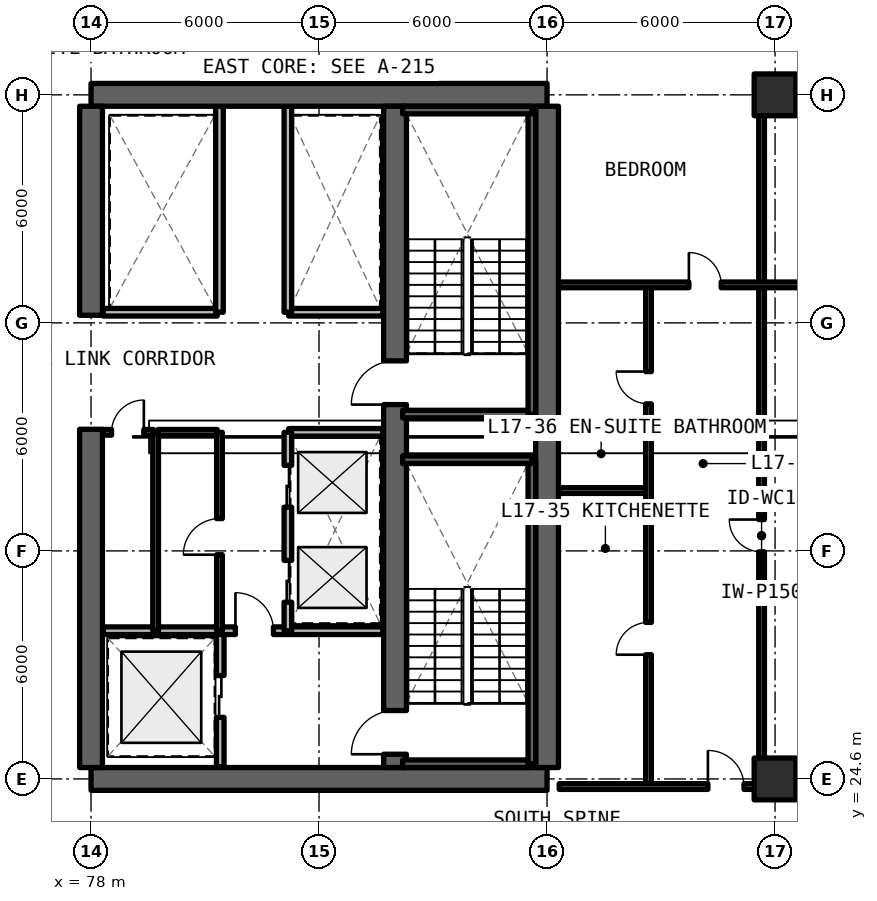
"""IFC4 building model, lengths in metres.
Left out: names, types, materials, properties, quantities, classifications, styles, units other than length and angle.
Written with IfcOpenShell. Run it as: python <this file> out.ifc"""

import sys

from ifc_helpers import new_model, si_unit, direction, frame, frame_2d, origin, origin_2d, place, context, subcontext, project, spatial, rectangle, extrude, element, fill, save


model = new_model("IFC4")
c1 = context("Model", 3, precision=1e-05, world=origin(), true_north=direction((0.0, 1.0)))
c2 = subcontext(c1, "Body", "Model", "MODEL_VIEW")
j1 = project(units=[si_unit("LENGTHUNIT", "METRE"), si_unit("PLANEANGLEUNIT", "RADIAN")], contexts=[c1])
p1 = place(None, origin())
s1 = spatial("IfcSite", under=j1, at=p1, CompositionType="ELEMENT")
p2 = place(p1, origin())
s2 = spatial("IfcBuilding", under=s1, at=p2, CompositionType="ELEMENT")
p3 = place(p2, frame((0.0, 0.0, 62.37)))
s3 = spatial("IfcBuildingStorey", under=s2, at=p3, CompositionType="ELEMENT", Elevation=62.37)
for number, where, z_axis, x_axis in (
    (1, (78.0, 24.6, 0.0), (0.0, 0.0, 1.0), (1.0, 0.0, 0.0)),
    (2, (90.0, 42.6, 0.0), (0.0, 0.0, 1.0), (-1.0, 0.0, 0.0)),
):
    element("IfcWall", number, at=place(p3, frame(where, z_axis=z_axis, x_axis=x_axis)), inside=s3, PredefinedType="SHEAR", context=c2, shape_type="SweptSolid", body=[
        extrude(rectangle(XDim=12.0, YDim=0.6, at=frame_2d((6.0, 0.0))), origin(), (0.0, 0.0, 1.0), 3.63),
    ])
p4 = place(p3, frame((90.0, 24.9, 0.0), z_axis=(0.0, 0.0, 1.0), x_axis=(0.0, 1.0, 0.0)))
e3 = element("IfcWall", 3, at=p4, inside=s3, PredefinedType="SHEAR", context=c2, shape_type="SweptSolid", body=[
    extrude(rectangle(XDim=17.4, YDim=0.6, at=frame_2d((8.7, 0.0))), origin(), (0.0, 0.0, 1.0), 3.63),
])
p5 = place(p3, frame((78.0, 24.9, 0.0), z_axis=(0.0, 0.0, 1.0), x_axis=(0.0, 1.0, 0.0)))
e4 = element("IfcWall", 4, at=p5, inside=s3, PredefinedType="SHEAR", context=c2, shape_type="SweptSolid", body=[
    extrude(rectangle(XDim=8.9, YDim=0.6, at=frame_2d((4.45, 0.0))), origin(), (0.0, 0.0, 1.0), 3.63),
])
p6 = place(p3, frame((78.0, 36.8, 0.0), z_axis=(0.0, 0.0, 1.0), x_axis=(0.0, 1.0, 0.0)))
e5 = element("IfcWall", 5, at=p6, inside=s3, PredefinedType="SHEAR", context=c2, shape_type="SweptSolid", body=[
    extrude(rectangle(XDim=5.5, YDim=0.6, at=frame_2d((2.75, 0.0))), origin(), (0.0, 0.0, 1.0), 3.63),
])
p7 = place(p3, frame((86.0, 24.9, 0.0), z_axis=(0.0, 0.0, 1.0), x_axis=(0.0, 1.0, 0.0)))
e6 = element("IfcWall", 6, at=p7, inside=s3, PredefinedType="SHEAR", context=c2, shape_type="SweptSolid", body=[
    extrude(rectangle(XDim=17.4, YDim=0.6, at=frame_2d((8.7, 0.0))), origin(), (0.0, 0.0, 1.0), 3.63),
])
p8 = place(p7, frame((0.35, 0.0, 0.0)))
e7 = element("IfcOpeningElement", 7, at=p8, cuts=e6, PredefinedType="OPENING", context=c2, shape_type="SweptSolid", body=[
    extrude(rectangle(XDim=1.15, YDim=2.15, at=frame_2d((0.575, 1.075))), frame((0.0, 0.31, 0.0), z_axis=(0.0, -1.0, 0.0), x_axis=(1.0, 0.0, 0.0)), (0.0, 0.0, 1.0), 0.62),
])
p9 = place(p7, frame((9.55, 0.0, 0.0)))
e8 = element("IfcOpeningElement", 8, at=p9, cuts=e6, PredefinedType="OPENING", context=c2, shape_type="SweptSolid", body=[
    extrude(rectangle(XDim=1.15, YDim=2.15, at=frame_2d((0.575, 1.075))), frame((0.0, 0.31, 0.0), z_axis=(0.0, -1.0, 0.0), x_axis=(1.0, 0.0, 0.0)), (0.0, 0.0, 1.0), 0.62),
])
for number, where, z_axis, x_axis in (
    (9, (96.0, 24.6, 0.0), (0.0, 0.0, 1.0), (1.0, 0.0, 0.0)),
    (10, (96.0, 42.6, 0.0), (0.0, 0.0, 1.0), (1.0, 0.0, 0.0)),
):
    element("IfcColumn", number, at=place(p3, frame(where, z_axis=z_axis, x_axis=x_axis)), inside=s3, PredefinedType="COLUMN", context=c2, shape_type="SweptSolid", body=[
        extrude(rectangle(XDim=1.1, YDim=1.1, at=origin_2d()), origin(), (0.0, 0.0, 1.0), 3.63),
    ])
p10 = place(p3, frame((81.4, 24.92, 0.0), z_axis=(0.0, 0.0, 1.0), x_axis=(0.0, 1.0, 0.0)))
e11 = element("IfcWall", 11, at=p10, inside=s3, PredefinedType="SOLIDWALL", context=c2, shape_type="SweptSolid", body=[
    extrude(rectangle(XDim=3.58, YDim=0.2, at=frame_2d((1.79, 0.0))), origin(), (0.0, 0.0, 1.0), 2.63),
])
p11 = place(p10, frame((1.3, 0.0, 0.0)))
e12 = element("IfcOpeningElement", 12, at=p11, cuts=e11, PredefinedType="OPENING", context=c2, shape_type="SweptSolid", body=[
    extrude(rectangle(XDim=1.1, YDim=2.2, at=frame_2d((0.55, 1.1))), frame((0.0, 0.11, 0.0), z_axis=(0.0, -1.0, 0.0), x_axis=(1.0, 0.0, 0.0)), (0.0, 0.0, 1.0), 0.22),
])
p12 = place(p3, frame((78.32, 28.5, 0.0), z_axis=(0.0, 0.0, 1.0), x_axis=(1.0, 0.0, 0.0)))
e13 = element("IfcWall", 13, at=p12, inside=s3, PredefinedType="SOLIDWALL", context=c2, shape_type="SweptSolid", body=[
    extrude(rectangle(XDim=7.36, YDim=0.2, at=frame_2d((3.68, 0.0))), origin(), (0.0, 0.0, 1.0), 2.63),
])
p13 = place(p12, frame((3.48, 0.0, 0.0)))
e14 = element("IfcOpeningElement", 14, at=p13, cuts=e13, PredefinedType="OPENING", context=c2, shape_type="SweptSolid", body=[
    extrude(rectangle(XDim=1.0, YDim=2.15, at=frame_2d((0.5, 1.075))), frame((0.0, 0.11, 0.0), z_axis=(0.0, -1.0, 0.0), x_axis=(1.0, 0.0, 0.0)), (0.0, 0.0, 1.0), 0.22),
])
p14 = place(p3, frame((83.2, 33.72, 0.0), z_axis=(0.0, 0.0, 1.0), x_axis=(1.0, 0.0, 0.0)))
e15 = element("IfcWall", 15, at=p14, inside=s3, PredefinedType="SOLIDWALL", context=c2, shape_type="SweptSolid", body=[
    extrude(rectangle(XDim=2.48, YDim=0.2, at=frame_2d((1.24, 0.0))), origin(), (0.0, 0.0, 1.0), 2.63),
])
p15 = place(p3, frame((83.18, 28.5, 0.0), z_axis=(0.0, 0.0, 1.0), x_axis=(0.0, 1.0, 0.0)))
e16 = element("IfcWall", 16, at=p15, inside=s3, PredefinedType="SOLIDWALL", context=c2, shape_type="SweptSolid", body=[
    extrude(rectangle(XDim=5.22, YDim=0.2, at=frame_2d((2.61, 0.0))), origin(), (0.0, 0.0, 1.0), 2.63),
])
p16 = place(p15, frame((0.75, 0.0, 0.0)))
e17 = element("IfcOpeningElement", 17, at=p16, cuts=e16, PredefinedType="OPENING", context=c2, shape_type="SweptSolid", body=[
    extrude(rectangle(XDim=1.1, YDim=2.2, at=frame_2d((0.55, 1.1))), frame((0.0, 0.11, 0.0), z_axis=(0.0, -1.0, 0.0), x_axis=(1.0, 0.0, 0.0)), (0.0, 0.0, 1.0), 0.22),
])
p17 = place(p15, frame((3.25, 0.0, 0.0)))
e18 = element("IfcOpeningElement", 18, at=p17, cuts=e16, PredefinedType="OPENING", context=c2, shape_type="SweptSolid", body=[
    extrude(rectangle(XDim=1.1, YDim=2.2, at=frame_2d((0.55, 1.1))), frame((0.0, 0.11, 0.0), z_axis=(0.0, -1.0, 0.0), x_axis=(1.0, 0.0, 0.0)), (0.0, 0.0, 1.0), 0.22),
])
p18 = place(p3, frame((79.7, 28.5, 0.0), z_axis=(0.0, 0.0, 1.0), x_axis=(0.0, 1.0, 0.0)))
e19 = element("IfcWall", 19, at=p18, inside=s3, PredefinedType="SOLIDWALL", context=c2, shape_type="SweptSolid", body=[
    extrude(rectangle(XDim=5.22, YDim=0.15, at=frame_2d((2.61, 0.0))), origin(), (0.0, 0.0, 1.0), 2.63),
])
p19 = place(p3, frame((79.76, 33.72, 0.0), z_axis=(0.0, 0.0, 1.0), x_axis=(1.0, 0.0, 0.0)))
e20 = element("IfcWall", 20, at=p19, inside=s3, PredefinedType="SOLIDWALL", context=c2, shape_type="SweptSolid", body=[
    extrude(rectangle(XDim=1.56, YDim=0.15, at=frame_2d((0.78, 0.0))), origin(), (0.0, 0.0, 1.0), 2.63),
])
p20 = place(p3, frame((78.32, 33.72, 0.0), z_axis=(0.0, 0.0, 1.0), x_axis=(1.0, 0.0, 0.0)))
e21 = element("IfcWall", 21, at=p20, inside=s3, PredefinedType="SOLIDWALL", context=c2, shape_type="SweptSolid", body=[
    extrude(rectangle(XDim=1.32, YDim=0.15, at=frame_2d((0.66, 0.0))), origin(), (0.0, 0.0, 1.0), 2.63),
])
p21 = place(p20, frame((0.22, 0.0, 0.0)))
e22 = element("IfcOpeningElement", 22, at=p21, cuts=e21, PredefinedType="OPENING", context=c2, shape_type="SweptSolid", body=[
    extrude(rectangle(XDim=0.85, YDim=2.1, at=frame_2d((0.425, 1.05))), frame((0.0, 0.085, 0.0), z_axis=(0.0, -1.0, 0.0), x_axis=(1.0, 0.0, 0.0)), (0.0, 0.0, 1.0), 0.17),
])
p22 = place(p3, frame((81.38, 28.5, 0.0), z_axis=(0.0, 0.0, 1.0), x_axis=(0.0, 1.0, 0.0)))
e23 = element("IfcWall", 23, at=p22, inside=s3, PredefinedType="SOLIDWALL", context=c2, shape_type="SweptSolid", body=[
    extrude(rectangle(XDim=5.22, YDim=0.15, at=frame_2d((2.61, 0.0))), origin(), (0.0, 0.0, 1.0), 2.63),
])
p23 = place(p22, frame((2.0, 0.0, 0.0)))
e24 = element("IfcOpeningElement", 24, at=p23, cuts=e23, PredefinedType="OPENING", context=c2, shape_type="SweptSolid", body=[
    extrude(rectangle(XDim=0.95, YDim=2.15, at=frame_2d((0.475, 1.075))), frame((0.0, 0.085, 0.0), z_axis=(0.0, -1.0, 0.0), x_axis=(1.0, 0.0, 0.0)), (0.0, 0.0, 1.0), 0.17),
])
p24 = place(p3, frame((83.2, 36.88, 0.0), z_axis=(0.0, 0.0, 1.0), x_axis=(1.0, 0.0, 0.0)))
e25 = element("IfcWall", 25, at=p24, inside=s3, PredefinedType="SOLIDWALL", context=c2, shape_type="SweptSolid", body=[
    extrude(rectangle(XDim=2.48, YDim=0.2, at=frame_2d((1.24, 0.0))), origin(), (0.0, 0.0, 1.0), 2.63),
])
p25 = place(p3, frame((83.18, 36.88, 0.0), z_axis=(0.0, 0.0, 1.0), x_axis=(0.0, 1.0, 0.0)))
e26 = element("IfcWall", 26, at=p25, inside=s3, PredefinedType="SOLIDWALL", context=c2, shape_type="SweptSolid", body=[
    extrude(rectangle(XDim=5.42, YDim=0.2, at=frame_2d((2.71, 0.0))), origin(), (0.0, 0.0, 1.0), 2.63),
])
p26 = place(p3, frame((78.32, 36.88, 0.0), z_axis=(0.0, 0.0, 1.0), x_axis=(1.0, 0.0, 0.0)))
e27 = element("IfcWall", 27, at=p26, inside=s3, PredefinedType="SOLIDWALL", context=c2, shape_type="SweptSolid", body=[
    extrude(rectangle(XDim=3.0, YDim=0.2, at=frame_2d((1.5, 0.0))), origin(), (0.0, 0.0, 1.0), 2.63),
])
p27 = place(p3, frame((81.38, 36.88, 0.0), z_axis=(0.0, 0.0, 1.0), x_axis=(0.0, 1.0, 0.0)))
e28 = element("IfcWall", 28, at=p27, inside=s3, PredefinedType="SOLIDWALL", context=c2, shape_type="SweptSolid", body=[
    extrude(rectangle(XDim=5.42, YDim=0.2, at=frame_2d((2.71, 0.0))), origin(), (0.0, 0.0, 1.0), 2.63),
])
p28 = place(p3, frame((95.645, 24.4, 0.0), z_axis=(0.0, 0.0, 1.0), x_axis=(0.0, 1.0, 0.0)))
e29 = element("IfcWall", 29, at=p28, inside=s3, PredefinedType="PARTITIONING", context=c2, shape_type="SweptSolid", body=[
    extrude(rectangle(XDim=13.2, YDim=0.15, at=frame_2d((6.6, 0.0))), origin(), (0.0, 0.0, 1.0), 2.63),
])
p29 = place(p28, frame((6.175, 0.0, 0.0)))
e30 = element("IfcOpeningElement", 30, at=p29, cuts=e29, PredefinedType="OPENING", context=c2, shape_type="SweptSolid", body=[
    extrude(rectangle(XDim=0.85, YDim=2.1, at=frame_2d((0.425, 1.05))), frame((0.0, 0.085, 0.0), z_axis=(0.0, -1.0, 0.0), x_axis=(1.0, 0.0, 0.0)), (0.0, 0.0, 1.0), 0.17),
])
p30 = place(p3, frame((90.32, 32.188, 0.0), z_axis=(0.0, 0.0, 1.0), x_axis=(1.0, 0.0, 0.0)))
e31 = element("IfcWall", 31, at=p30, inside=s3, PredefinedType="PARTITIONING", context=c2, shape_type="SweptSolid", body=[
    extrude(rectangle(XDim=2.35, YDim=0.15, at=frame_2d((1.175, 0.0))), origin(), (0.0, 0.0, 1.0), 2.63),
])
p31 = place(p3, frame((92.67, 24.4, 0.0), z_axis=(0.0, 0.0, 1.0), x_axis=(0.0, 1.0, 0.0)))
e32 = element("IfcWall", 32, at=p31, inside=s3, PredefinedType="PARTITIONING", context=c2, shape_type="SweptSolid", body=[
    extrude(rectangle(XDim=13.2, YDim=0.15, at=frame_2d((6.6, 0.0))), origin(), (0.0, 0.0, 1.0), 2.63),
])
p32 = place(p31, frame((3.469, 0.0, 0.0)))
e33 = element("IfcOpeningElement", 33, at=p32, cuts=e32, PredefinedType="OPENING", context=c2, shape_type="SweptSolid", body=[
    extrude(rectangle(XDim=0.85, YDim=2.1, at=frame_2d((0.425, 1.05))), frame((0.0, 0.085, 0.0), z_axis=(0.0, -1.0, 0.0), x_axis=(1.0, 0.0, 0.0)), (0.0, 0.0, 1.0), 0.17),
])
p33 = place(p31, frame((10.069, 0.0, 0.0)))
e34 = element("IfcOpeningElement", 34, at=p33, cuts=e32, PredefinedType="OPENING", context=c2, shape_type="SweptSolid", body=[
    extrude(rectangle(XDim=0.85, YDim=2.1, at=frame_2d((0.425, 1.05))), frame((0.0, 0.085, 0.0), z_axis=(0.0, -1.0, 0.0), x_axis=(1.0, 0.0, 0.0)), (0.0, 0.0, 1.0), 0.17),
])
p34 = place(p3, frame((95.645, 37.6, 0.0), z_axis=(0.0, 0.0, 1.0), x_axis=(0.0, 1.0, 0.0)))
e35 = element("IfcWall", 35, at=p34, inside=s3, PredefinedType="PARTITIONING", context=c2, shape_type="SweptSolid", body=[
    extrude(rectangle(XDim=5.2, YDim=0.15, at=frame_2d((2.6, 0.0))), origin(), (0.0, 0.0, 1.0), 2.63),
])
p35 = place(p3, frame((90.32, 37.6, 0.0), z_axis=(0.0, 0.0, 1.0), x_axis=(1.0, 0.0, 0.0)))
e36 = element("IfcWall", 36, at=p35, inside=s3, PredefinedType="PARTITIONING", context=c2, shape_type="SweptSolid", body=[
    extrude(rectangle(XDim=10.24, YDim=0.15, at=frame_2d((5.12, 0.0))), origin(), (0.0, 0.0, 1.0), 2.63),
])
p36 = place(p35, frame((3.412, 0.0, 0.0)))
e37 = element("IfcOpeningElement", 37, at=p36, cuts=e36, PredefinedType="OPENING", context=c2, shape_type="SweptSolid", body=[
    extrude(rectangle(XDim=0.85, YDim=2.1, at=frame_2d((0.425, 1.05))), frame((0.0, 0.085, 0.0), z_axis=(0.0, -1.0, 0.0), x_axis=(1.0, 0.0, 0.0)), (0.0, 0.0, 1.0), 0.17),
])
p37 = place(p35, frame((7.357, 0.0, 0.0)))
e38 = element("IfcOpeningElement", 38, at=p37, cuts=e36, PredefinedType="OPENING", context=c2, shape_type="SweptSolid", body=[
    extrude(rectangle(XDim=0.85, YDim=2.1, at=frame_2d((0.425, 1.05))), frame((0.0, 0.085, 0.0), z_axis=(0.0, -1.0, 0.0), x_axis=(1.0, 0.0, 0.0)), (0.0, 0.0, 1.0), 0.17),
])
p38 = place(p3, frame((90.32, 24.4, 0.0), z_axis=(0.0, 0.0, 1.0), x_axis=(1.0, 0.0, 0.0)))
e39 = element("IfcWall", 39, at=p38, inside=s3, PredefinedType="SOLIDWALL", context=c2, shape_type="SweptSolid", body=[
    extrude(rectangle(XDim=10.24, YDim=0.15, at=frame_2d((5.12, 0.0))), origin(), (0.0, 0.0, 1.0), 2.625),
])
p39 = place(p38, frame((3.913, 0.0, 0.0)))
e40 = element("IfcOpeningElement", 40, at=p39, cuts=e39, PredefinedType="OPENING", context=c2, shape_type="SweptSolid", body=[
    extrude(rectangle(XDim=0.95, YDim=2.15, at=frame_2d((0.475, 1.075))), frame((0.0, 0.085, 0.0), z_axis=(0.0, -1.0, 0.0), x_axis=(1.0, 0.0, 0.0)), (0.0, 0.0, 1.0), 0.17),
])
p40 = place(p3, frame((86.2, 25.0, 0.0), z_axis=(0.0, 0.0, 1.0), x_axis=(1.0, 0.0, 0.0)))
e41 = element("IfcWall", 41, at=p40, inside=s3, PredefinedType="SOLIDWALL", context=c2, shape_type="SweptSolid", body=[
    extrude(rectangle(XDim=3.4, YDim=0.2, at=frame_2d((1.7, 0.0))), origin(), (0.0, 0.0, 1.0), 3.63),
])
p41 = place(p3, frame((89.6, 25.0, 0.0), z_axis=(0.0, 0.0, 1.0), x_axis=(0.0, 1.0, 0.0)))
e42 = element("IfcWall", 42, at=p41, inside=s3, PredefinedType="SOLIDWALL", context=c2, shape_type="SweptSolid", body=[
    extrude(rectangle(XDim=8.0, YDim=0.2, at=frame_2d((4.0, 0.0))), origin(), (0.0, 0.0, 1.0), 3.63),
])
for number, where, z_axis, x_axis in (
    (43, (89.6, 33.0, 0.0), (0.0, 0.0, 1.0), (-1.0, 0.0, 0.0)),
    (44, (86.2, 34.2, 0.0), (0.0, 0.0, 1.0), (1.0, 0.0, 0.0)),
):
    element("IfcWall", number, at=place(p3, frame(where, z_axis=z_axis, x_axis=x_axis)), inside=s3, PredefinedType="SOLIDWALL", context=c2, shape_type="SweptSolid", body=[
        extrude(rectangle(XDim=3.4, YDim=0.2, at=frame_2d((1.7, 0.0))), origin(), (0.0, 0.0, 1.0), 3.63),
    ])
p42 = place(p3, frame((89.6, 34.2, 0.0), z_axis=(0.0, 0.0, 1.0), x_axis=(0.0, 1.0, 0.0)))
e45 = element("IfcWall", 45, at=p42, inside=s3, PredefinedType="SOLIDWALL", context=c2, shape_type="SweptSolid", body=[
    extrude(rectangle(XDim=8.0, YDim=0.2, at=frame_2d((4.0, 0.0))), origin(), (0.0, 0.0, 1.0), 3.63),
])
p43 = place(p3, frame((89.6, 42.2, 0.0), z_axis=(0.0, 0.0, 1.0), x_axis=(-1.0, 0.0, 0.0)))
e46 = element("IfcWall", 46, at=p43, inside=s3, PredefinedType="SOLIDWALL", context=c2, shape_type="SweptSolid", body=[
    extrude(rectangle(XDim=3.4, YDim=0.2, at=frame_2d((1.7, 0.0))), origin(), (0.0, 0.0, 1.0), 3.63),
])
p44 = place(p11, origin())
e47 = element("IfcDoor", 47, at=p44, inside=s3, OperationType="SLIDING_TO_LEFT", PredefinedType="DOOR", context=c2, shape_type="SweptSolid", body=[
    extrude(rectangle(XDim=1.1, YDim=2.2, at=frame_2d((0.55, 1.1))), frame((0.0, 0.025, 0.0), z_axis=(0.0, -1.0, 0.0), x_axis=(1.0, 0.0, 0.0)), (0.0, 0.0, 1.0), 0.05),
])
fill(e12, e47)
p45 = place(p13, origin())
e48 = element("IfcDoor", 48, at=p45, inside=s3, OperationType="SINGLE_SWING_LEFT", PredefinedType="DOOR", context=c2, shape_type="SweptSolid", body=[
    extrude(rectangle(XDim=1.0, YDim=2.15, at=frame_2d((0.5, 1.075))), frame((0.0, 0.025, 0.0), z_axis=(0.0, -1.0, 0.0), x_axis=(1.0, 0.0, 0.0)), (0.0, 0.0, 1.0), 0.05),
])
fill(e14, e48)
p46 = place(p16, origin())
e49 = element("IfcDoor", 49, at=p46, inside=s3, OperationType="SLIDING_TO_LEFT", PredefinedType="DOOR", context=c2, shape_type="SweptSolid", body=[
    extrude(rectangle(XDim=1.1, YDim=2.2, at=frame_2d((0.55, 1.1))), frame((0.0, 0.025, 0.0), z_axis=(0.0, -1.0, 0.0), x_axis=(1.0, 0.0, 0.0)), (0.0, 0.0, 1.0), 0.05),
])
fill(e17, e49)
p47 = place(p17, origin())
e50 = element("IfcDoor", 50, at=p47, inside=s3, OperationType="SLIDING_TO_RIGHT", PredefinedType="DOOR", context=c2, shape_type="SweptSolid", body=[
    extrude(rectangle(XDim=1.1, YDim=2.2, at=frame_2d((0.55, 1.1))), frame((0.0, 0.025, 0.0), z_axis=(0.0, -1.0, 0.0), x_axis=(1.0, 0.0, 0.0)), (0.0, 0.0, 1.0), 0.05),
])
fill(e18, e50)
p48 = place(p21, origin())
e51 = element("IfcDoor", 51, at=p48, inside=s3, OperationType="SINGLE_SWING_RIGHT", PredefinedType="DOOR", context=c2, shape_type="SweptSolid", body=[
    extrude(rectangle(XDim=0.85, YDim=2.1, at=frame_2d((0.425, 1.05))), frame((0.0, 0.025, 0.0), z_axis=(0.0, -1.0, 0.0), x_axis=(1.0, 0.0, 0.0)), (0.0, 0.0, 1.0), 0.05),
])
fill(e22, e51)
p49 = place(p23, origin())
e52 = element("IfcDoor", 52, at=p49, inside=s3, OperationType="SINGLE_SWING_LEFT", PredefinedType="DOOR", context=c2, shape_type="SweptSolid", body=[
    extrude(rectangle(XDim=0.95, YDim=2.15, at=frame_2d((0.475, 1.075))), frame((0.0, 0.025, 0.0), z_axis=(0.0, -1.0, 0.0), x_axis=(1.0, 0.0, 0.0)), (0.0, 0.0, 1.0), 0.05),
])
fill(e24, e52)
p50 = place(p29, origin())
e53 = element("IfcDoor", 53, at=p50, inside=s3, OperationType="SINGLE_SWING_RIGHT", PredefinedType="DOOR", context=c2, shape_type="SweptSolid", body=[
    extrude(rectangle(XDim=0.85, YDim=2.1, at=frame_2d((0.425, 1.05))), frame((0.0, 0.025, 0.0), z_axis=(0.0, -1.0, 0.0), x_axis=(1.0, 0.0, 0.0)), (0.0, 0.0, 1.0), 0.05),
])
fill(e30, e53)
p51 = place(p32, origin())
e54 = element("IfcDoor", 54, at=p51, inside=s3, OperationType="SINGLE_SWING_LEFT", PredefinedType="DOOR", context=c2, shape_type="SweptSolid", body=[
    extrude(rectangle(XDim=0.85, YDim=2.1, at=frame_2d((0.425, 1.05))), frame((0.0, 0.025, 0.0), z_axis=(0.0, -1.0, 0.0), x_axis=(1.0, 0.0, 0.0)), (0.0, 0.0, 1.0), 0.05),
])
fill(e33, e54)
p52 = place(p33, origin())
e55 = element("IfcDoor", 55, at=p52, inside=s3, OperationType="SINGLE_SWING_RIGHT", PredefinedType="DOOR", context=c2, shape_type="SweptSolid", body=[
    extrude(rectangle(XDim=0.85, YDim=2.1, at=frame_2d((0.425, 1.05))), frame((0.0, 0.025, 0.0), z_axis=(0.0, -1.0, 0.0), x_axis=(1.0, 0.0, 0.0)), (0.0, 0.0, 1.0), 0.05),
])
fill(e34, e55)
p53 = place(p36, origin())
e56 = element("IfcDoor", 56, at=p53, inside=s3, OperationType="SINGLE_SWING_LEFT", PredefinedType="DOOR", context=c2, shape_type="SweptSolid", body=[
    extrude(rectangle(XDim=0.85, YDim=2.1, at=frame_2d((0.425, 1.05))), frame((0.0, 0.025, 0.0), z_axis=(0.0, -1.0, 0.0), x_axis=(1.0, 0.0, 0.0)), (0.0, 0.0, 1.0), 0.05),
])
fill(e37, e56)
p54 = place(p39, origin())
e57 = element("IfcDoor", 57, at=p54, inside=s3, OperationType="SINGLE_SWING_LEFT", PredefinedType="DOOR", context=c2, shape_type="SweptSolid", body=[
    extrude(rectangle(XDim=0.95, YDim=2.15, at=frame_2d((0.475, 1.075))), frame((0.0, 0.025, 0.0), z_axis=(0.0, -1.0, 0.0), x_axis=(1.0, 0.0, 0.0)), (0.0, 0.0, 1.0), 0.05),
])
fill(e40, e57)
p55 = place(p8, origin())
e58 = element("IfcDoor", 58, at=p55, inside=s3, OperationType="SINGLE_SWING_RIGHT", PredefinedType="DOOR", context=c2, shape_type="SweptSolid", body=[
    extrude(rectangle(XDim=1.15, YDim=2.15, at=frame_2d((0.575, 1.075))), frame((0.0, 0.025, 0.0), z_axis=(0.0, -1.0, 0.0), x_axis=(1.0, 0.0, 0.0)), (0.0, 0.0, 1.0), 0.05),
])
fill(e7, e58)
p56 = place(p9, origin())
e59 = element("IfcDoor", 59, at=p56, inside=s3, OperationType="SINGLE_SWING_LEFT", PredefinedType="DOOR", context=c2, shape_type="SweptSolid", body=[
    extrude(rectangle(XDim=1.15, YDim=2.15, at=frame_2d((0.575, 1.075))), frame((0.0, 0.025, 0.0), z_axis=(0.0, -1.0, 0.0), x_axis=(1.0, 0.0, 0.0)), (0.0, 0.0, 1.0), 0.05),
])
fill(e8, e59)
save(model, sys.argv[1])
